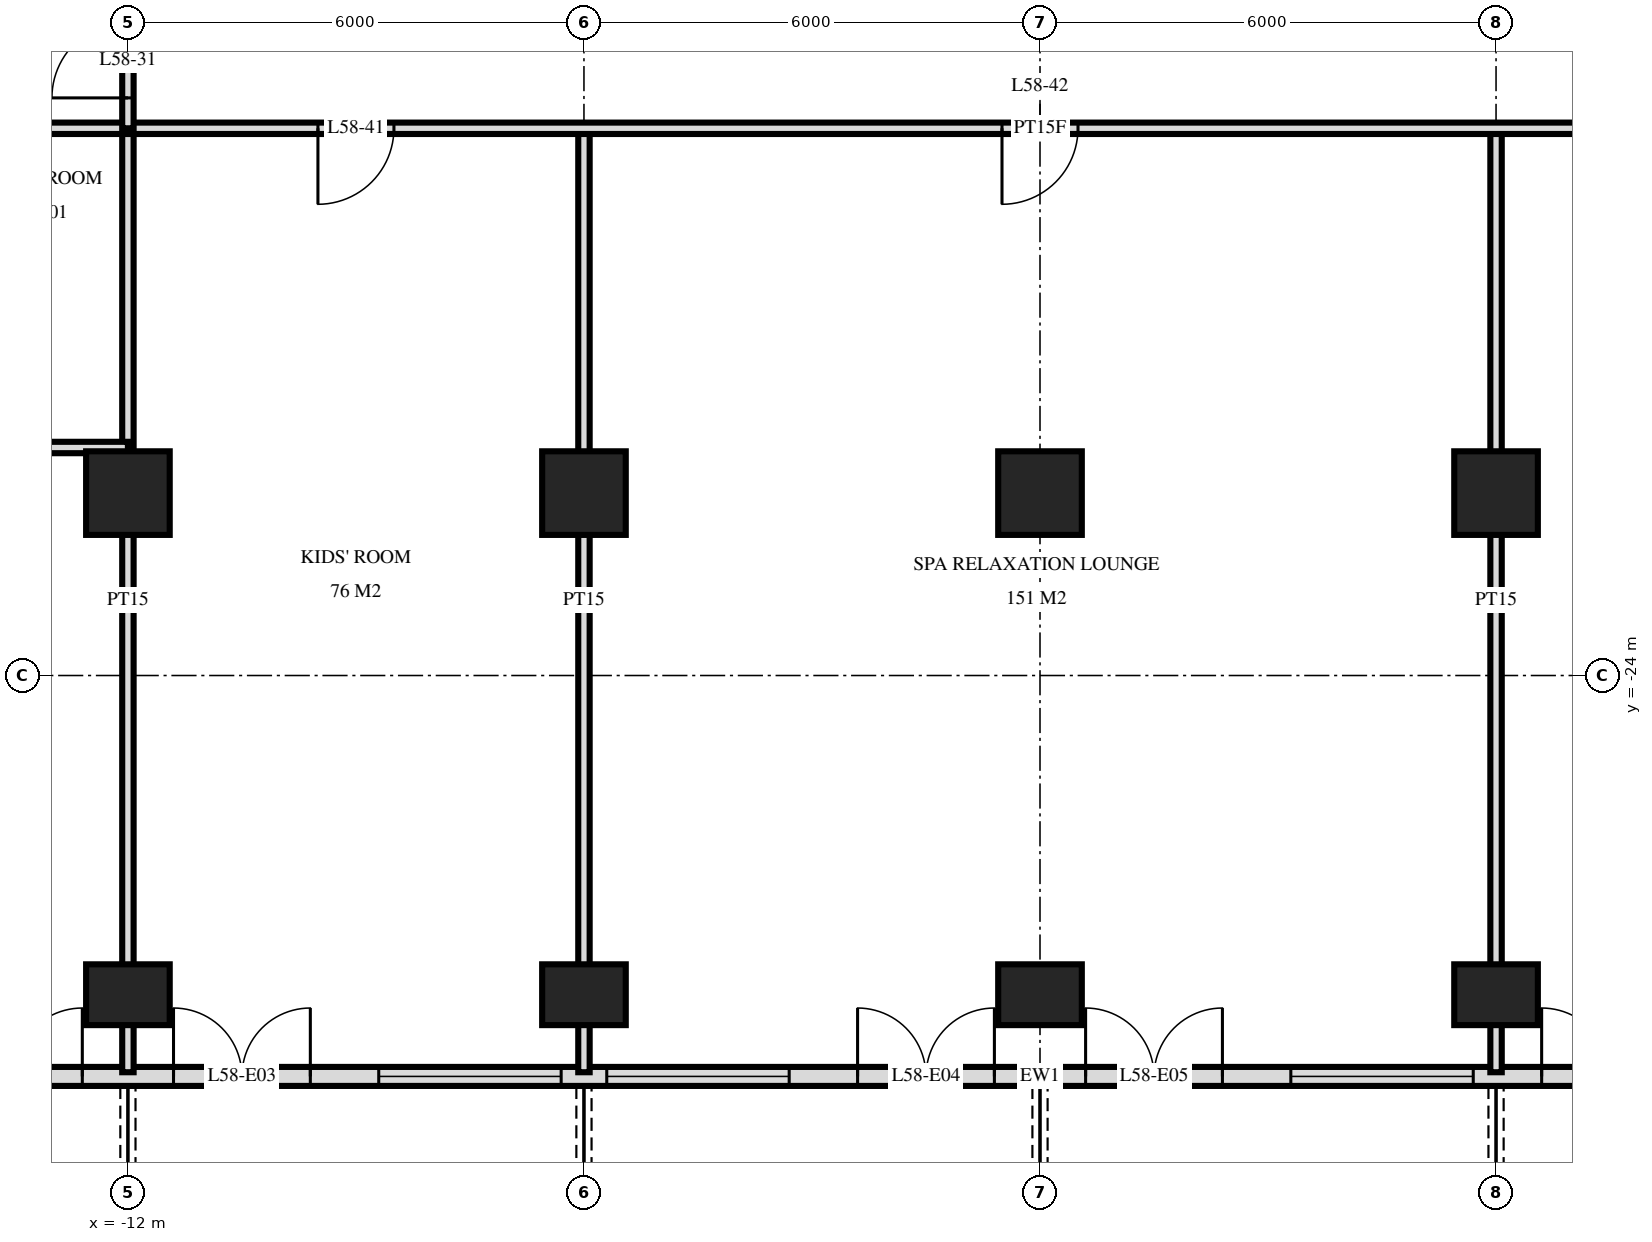
"""IFC4 building model, lengths in metres.
Left out: names, types, materials, properties, quantities, classifications, styles, units other than length and angle.
Written with IfcOpenShell. Run it as: python <this file> out.ifc"""

import sys

from ifc_helpers import new_model, si_unit, direction, frame, frame_2d, origin, origin_2d, place, context, subcontext, project, spatial, rectangle, extrude, element, fill, save


model = new_model("IFC4")
c1 = context("Model", 3, precision=1e-05, world=origin(), true_north=direction((0.0, 1.0)))
c2 = subcontext(c1, "Body", "Model", "MODEL_VIEW")
j1 = project(units=[si_unit("LENGTHUNIT", "METRE"), si_unit("PLANEANGLEUNIT", "RADIAN")], contexts=[c1])
p1 = place(None, origin())
s1 = spatial("IfcSite", under=j1, at=p1, CompositionType="ELEMENT")
p2 = place(p1, origin())
s2 = spatial("IfcBuilding", under=s1, at=p2, CompositionType="ELEMENT")
p3 = place(p2, frame((0.0, 0.0, 222.1)))
s3 = spatial("IfcBuildingStorey", under=s2, at=p3, CompositionType="ELEMENT", Elevation=222.1)
p4 = place(p3, frame((-12.0, -28.2, 0.0), z_axis=(0.0, 0.0, 1.0), x_axis=(1.0, 0.0, 0.0)))
e1 = element("IfcColumn", 1, at=p4, inside=s3, PredefinedType="COLUMN", context=c2, shape_type="SweptSolid", body=[
    extrude(rectangle(XDim=1.1, YDim=0.8, at=origin_2d()), origin(), (0.0, 0.0, 1.0), 3.5),
])
p5 = place(p3, frame((-12.0, -21.6, 0.0), z_axis=(0.0, 0.0, 1.0), x_axis=(1.0, 0.0, 0.0)))
e2 = element("IfcColumn", 2, at=p5, inside=s3, PredefinedType="COLUMN", context=c2, shape_type="SweptSolid", body=[
    extrude(rectangle(XDim=1.1, YDim=1.1, at=origin_2d()), origin(), (0.0, 0.0, 1.0), 3.5),
])
p6 = place(p3, frame((-6.0, -28.2, 0.0), z_axis=(0.0, 0.0, 1.0), x_axis=(1.0, 0.0, 0.0)))
e3 = element("IfcColumn", 3, at=p6, inside=s3, PredefinedType="COLUMN", context=c2, shape_type="SweptSolid", body=[
    extrude(rectangle(XDim=1.1, YDim=0.8, at=origin_2d()), origin(), (0.0, 0.0, 1.0), 3.5),
])
p7 = place(p3, frame((-6.0, -21.6, 0.0), z_axis=(0.0, 0.0, 1.0), x_axis=(1.0, 0.0, 0.0)))
e4 = element("IfcColumn", 4, at=p7, inside=s3, PredefinedType="COLUMN", context=c2, shape_type="SweptSolid", body=[
    extrude(rectangle(XDim=1.1, YDim=1.1, at=origin_2d()), origin(), (0.0, 0.0, 1.0), 3.5),
])
p8 = place(p3, frame((0.0, -28.2, 0.0), z_axis=(0.0, 0.0, 1.0), x_axis=(1.0, 0.0, 0.0)))
e5 = element("IfcColumn", 5, at=p8, inside=s3, PredefinedType="COLUMN", context=c2, shape_type="SweptSolid", body=[
    extrude(rectangle(XDim=1.1, YDim=0.8, at=origin_2d()), origin(), (0.0, 0.0, 1.0), 3.5),
])
p9 = place(p3, frame((0.0, -21.6, 0.0), z_axis=(0.0, 0.0, 1.0), x_axis=(1.0, 0.0, 0.0)))
e6 = element("IfcColumn", 6, at=p9, inside=s3, PredefinedType="COLUMN", context=c2, shape_type="SweptSolid", body=[
    extrude(rectangle(XDim=1.1, YDim=1.1, at=origin_2d()), origin(), (0.0, 0.0, 1.0), 3.5),
])
p10 = place(p3, frame((6.0, -28.2, 0.0), z_axis=(0.0, 0.0, 1.0), x_axis=(1.0, 0.0, 0.0)))
e7 = element("IfcColumn", 7, at=p10, inside=s3, PredefinedType="COLUMN", context=c2, shape_type="SweptSolid", body=[
    extrude(rectangle(XDim=1.1, YDim=0.8, at=origin_2d()), origin(), (0.0, 0.0, 1.0), 3.5),
])
p11 = place(p3, frame((6.0, -21.6, 0.0), z_axis=(0.0, 0.0, 1.0), x_axis=(1.0, 0.0, 0.0)))
e8 = element("IfcColumn", 8, at=p11, inside=s3, PredefinedType="COLUMN", context=c2, shape_type="SweptSolid", body=[
    extrude(rectangle(XDim=1.1, YDim=1.1, at=origin_2d()), origin(), (0.0, 0.0, 1.0), 3.5),
])
p12 = place(p3, frame((-22.475, -29.275, 0.0), z_axis=(0.0, 0.0, 1.0), x_axis=(1.0, 0.0, 0.0)))
e9 = element("IfcWall", 9, at=p12, inside=s3, PredefinedType="SOLIDWALL", context=c2, shape_type="SweptSolid", body=[
    extrude(rectangle(XDim=44.951, YDim=0.25, at=frame_2d((22.475, 0.0))), origin(), (0.0, 0.0, 1.0), 3.22),
])
p13 = place(p12, frame((0.575, 0.0, 0.0)))
e10 = element("IfcOpeningElement", 10, at=p13, cuts=e9, PredefinedType="OPENING", context=c2, shape_type="SweptSolid", body=[
    extrude(rectangle(XDim=1.8, YDim=2.4, at=frame_2d((0.9, 1.2))), frame((0.0, 0.135, 0.0), z_axis=(0.0, -1.0, 0.0), x_axis=(1.0, 0.0, 0.0)), (0.0, 0.0, 1.0), 0.27),
])
p14 = place(p12, frame((4.775, 0.0, 0.9)))
e11 = element("IfcOpeningElement", 11, at=p14, cuts=e9, PredefinedType="OPENING", context=c2, shape_type="SweptSolid", body=[
    extrude(rectangle(XDim=2.4, YDim=1.5, at=frame_2d((1.2, 0.75))), frame((0.0, 0.135, 0.0), z_axis=(0.0, -1.0, 0.0), x_axis=(1.0, 0.0, 0.0)), (0.0, 0.0, 1.0), 0.27),
])
p15 = place(p12, frame((8.075, 0.0, 0.0)))
e12 = element("IfcOpeningElement", 12, at=p15, cuts=e9, PredefinedType="OPENING", context=c2, shape_type="SweptSolid", body=[
    extrude(rectangle(XDim=1.8, YDim=2.4, at=frame_2d((0.9, 1.2))), frame((0.0, 0.135, 0.0), z_axis=(0.0, -1.0, 0.0), x_axis=(1.0, 0.0, 0.0)), (0.0, 0.0, 1.0), 0.27),
])
p16 = place(p12, frame((11.075, 0.0, 0.0)))
e13 = element("IfcOpeningElement", 13, at=p16, cuts=e9, PredefinedType="OPENING", context=c2, shape_type="SweptSolid", body=[
    extrude(rectangle(XDim=1.8, YDim=2.4, at=frame_2d((0.9, 1.2))), frame((0.0, 0.135, 0.0), z_axis=(0.0, -1.0, 0.0), x_axis=(1.0, 0.0, 0.0)), (0.0, 0.0, 1.0), 0.27),
])
p17 = place(p12, frame((13.775, 0.0, 0.9)))
e14 = element("IfcOpeningElement", 14, at=p17, cuts=e9, PredefinedType="OPENING", context=c2, shape_type="SweptSolid", body=[
    extrude(rectangle(XDim=2.4, YDim=1.5, at=frame_2d((1.2, 0.75))), frame((0.0, 0.135, 0.0), z_axis=(0.0, -1.0, 0.0), x_axis=(1.0, 0.0, 0.0)), (0.0, 0.0, 1.0), 0.27),
])
p18 = place(p12, frame((16.775, 0.0, 0.9)))
e15 = element("IfcOpeningElement", 15, at=p18, cuts=e9, PredefinedType="OPENING", context=c2, shape_type="SweptSolid", body=[
    extrude(rectangle(XDim=2.4, YDim=1.5, at=frame_2d((1.2, 0.75))), frame((0.0, 0.135, 0.0), z_axis=(0.0, -1.0, 0.0), x_axis=(1.0, 0.0, 0.0)), (0.0, 0.0, 1.0), 0.27),
])
p19 = place(p12, frame((20.075, 0.0, 0.0)))
e16 = element("IfcOpeningElement", 16, at=p19, cuts=e9, PredefinedType="OPENING", context=c2, shape_type="SweptSolid", body=[
    extrude(rectangle(XDim=1.8, YDim=2.4, at=frame_2d((0.9, 1.2))), frame((0.0, 0.135, 0.0), z_axis=(0.0, -1.0, 0.0), x_axis=(1.0, 0.0, 0.0)), (0.0, 0.0, 1.0), 0.27),
])
p20 = place(p12, frame((23.075, 0.0, 0.0)))
e17 = element("IfcOpeningElement", 17, at=p20, cuts=e9, PredefinedType="OPENING", context=c2, shape_type="SweptSolid", body=[
    extrude(rectangle(XDim=1.8, YDim=2.4, at=frame_2d((0.9, 1.2))), frame((0.0, 0.135, 0.0), z_axis=(0.0, -1.0, 0.0), x_axis=(1.0, 0.0, 0.0)), (0.0, 0.0, 1.0), 0.27),
])
p21 = place(p12, frame((25.775, 0.0, 0.9)))
e18 = element("IfcOpeningElement", 18, at=p21, cuts=e9, PredefinedType="OPENING", context=c2, shape_type="SweptSolid", body=[
    extrude(rectangle(XDim=2.4, YDim=1.5, at=frame_2d((1.2, 0.75))), frame((0.0, 0.135, 0.0), z_axis=(0.0, -1.0, 0.0), x_axis=(1.0, 0.0, 0.0)), (0.0, 0.0, 1.0), 0.27),
])
p22 = place(p12, frame((29.075, 0.0, 0.0)))
e19 = element("IfcOpeningElement", 19, at=p22, cuts=e9, PredefinedType="OPENING", context=c2, shape_type="SweptSolid", body=[
    extrude(rectangle(XDim=1.8, YDim=2.4, at=frame_2d((0.9, 1.2))), frame((0.0, 0.135, 0.0), z_axis=(0.0, -1.0, 0.0), x_axis=(1.0, 0.0, 0.0)), (0.0, 0.0, 1.0), 0.27),
])
p23 = place(p12, frame((31.775, 0.0, 0.9)))
e20 = element("IfcOpeningElement", 20, at=p23, cuts=e9, PredefinedType="OPENING", context=c2, shape_type="SweptSolid", body=[
    extrude(rectangle(XDim=2.4, YDim=1.5, at=frame_2d((1.2, 0.75))), frame((0.0, 0.135, 0.0), z_axis=(0.0, -1.0, 0.0), x_axis=(1.0, 0.0, 0.0)), (0.0, 0.0, 1.0), 0.27),
])
p24 = place(p12, frame((35.075, 0.0, 0.0)))
e21 = element("IfcOpeningElement", 21, at=p24, cuts=e9, PredefinedType="OPENING", context=c2, shape_type="SweptSolid", body=[
    extrude(rectangle(XDim=1.8, YDim=2.4, at=frame_2d((0.9, 1.2))), frame((0.0, 0.135, 0.0), z_axis=(0.0, -1.0, 0.0), x_axis=(1.0, 0.0, 0.0)), (0.0, 0.0, 1.0), 0.27),
])
p25 = place(p12, frame((41.075, 0.0, 0.0)))
e22 = element("IfcOpeningElement", 22, at=p25, cuts=e9, PredefinedType="OPENING", context=c2, shape_type="SweptSolid", body=[
    extrude(rectangle(XDim=1.8, YDim=2.4, at=frame_2d((0.9, 1.2))), frame((0.0, 0.135, 0.0), z_axis=(0.0, -1.0, 0.0), x_axis=(1.0, 0.0, 0.0)), (0.0, 0.0, 1.0), 0.27),
])
for number, where, z_axis, x_axis in (
    (23, (6.0, -29.22, 0.0), (0.0, 0.0, 1.0), (0.0, 1.0, 0.0)),
    (24, (-6.0, -29.22, 0.0), (0.0, 0.0, 1.0), (0.0, 1.0, 0.0)),
):
    element("IfcWall", number, at=place(p3, frame(where, z_axis=z_axis, x_axis=x_axis)), inside=s3, PredefinedType="PARTITIONING", context=c2, shape_type="SweptSolid", body=[
        extrude(rectangle(XDim=12.42, YDim=0.15, at=frame_2d((6.21, 0.0))), origin(), (0.0, 0.0, 1.0), 3.22),
    ])
p26 = place(p3, frame((-12.0, -16.8, 0.0), z_axis=(0.0, 0.0, 1.0), x_axis=(0.0, 1.0, 0.0)))
e25 = element("IfcWall", 25, at=p26, inside=s3, PredefinedType="PARTITIONING", context=c2, shape_type="SweptSolid", body=[
    extrude(rectangle(XDim=1.75, YDim=0.15, at=frame_2d((0.875, 0.0))), origin(), (0.0, 0.0, 1.0), 3.22),
])
p27 = place(p26, frame((0.4, 0.0, 0.0)))
e26 = element("IfcOpeningElement", 26, at=p27, cuts=e25, PredefinedType="OPENING", context=c2, shape_type="SweptSolid", body=[
    extrude(rectangle(XDim=1.0, YDim=2.1, at=frame_2d((0.5, 1.05))), frame((0.0, 0.085, 0.0), z_axis=(0.0, -1.0, 0.0), x_axis=(1.0, 0.0, 0.0)), (0.0, 0.0, 1.0), 0.17),
])
p28 = place(p3, frame((-12.0, -29.22, 0.0), z_axis=(0.0, 0.0, 1.0), x_axis=(0.0, 1.0, 0.0)))
e27 = element("IfcWall", 27, at=p28, inside=s3, PredefinedType="PARTITIONING", context=c2, shape_type="SweptSolid", body=[
    extrude(rectangle(XDim=12.42, YDim=0.15, at=frame_2d((6.21, 0.0))), origin(), (0.0, 0.0, 1.0), 3.22),
])
p29 = place(p3, frame((-14.4, -21.0, 0.0), z_axis=(0.0, 0.0, 1.0), x_axis=(1.0, 0.0, 0.0)))
e28 = element("IfcWall", 28, at=p29, inside=s3, PredefinedType="PARTITIONING", context=c2, shape_type="SweptSolid", body=[
    extrude(rectangle(XDim=2.4, YDim=0.15, at=frame_2d((1.2, 0.0))), origin(), (0.0, 0.0, 1.0), 3.22),
])
p30 = place(p3, frame((-26.82, -16.8, 0.0), z_axis=(0.0, 0.0, 1.0), x_axis=(1.0, 0.0, 0.0)))
e29 = element("IfcWall", 29, at=p30, inside=s3, PredefinedType="PARTITIONING", context=c2, shape_type="SweptSolid", body=[
    extrude(rectangle(XDim=53.64, YDim=0.15, at=frame_2d((26.82, 0.0))), origin(), (0.0, 0.0, 1.0), 3.22),
])
p31 = place(p30, frame((11.17, 0.0, 0.0)))
e30 = element("IfcOpeningElement", 30, at=p31, cuts=e29, PredefinedType="OPENING", context=c2, shape_type="SweptSolid", body=[
    extrude(rectangle(XDim=1.0, YDim=2.1, at=frame_2d((0.5, 1.05))), frame((0.0, 0.085, 0.0), z_axis=(0.0, -1.0, 0.0), x_axis=(1.0, 0.0, 0.0)), (0.0, 0.0, 1.0), 0.17),
])
p32 = place(p30, frame((3.22, 0.0, 0.0)))
e31 = element("IfcOpeningElement", 31, at=p32, cuts=e29, PredefinedType="OPENING", context=c2, shape_type="SweptSolid", body=[
    extrude(rectangle(XDim=1.0, YDim=2.1, at=frame_2d((0.5, 1.05))), frame((0.0, 0.085, 0.0), z_axis=(0.0, -1.0, 0.0), x_axis=(1.0, 0.0, 0.0)), (0.0, 0.0, 1.0), 0.17),
])
p33 = place(p30, frame((5.02, 0.0, 0.0)))
e32 = element("IfcOpeningElement", 32, at=p33, cuts=e29, PredefinedType="OPENING", context=c2, shape_type="SweptSolid", body=[
    extrude(rectangle(XDim=1.0, YDim=2.1, at=frame_2d((0.5, 1.05))), frame((0.0, 0.085, 0.0), z_axis=(0.0, -1.0, 0.0), x_axis=(1.0, 0.0, 0.0)), (0.0, 0.0, 1.0), 0.17),
])
p34 = place(p30, frame((47.72, 0.0, 0.0)))
e33 = element("IfcOpeningElement", 33, at=p34, cuts=e29, PredefinedType="OPENING", context=c2, shape_type="SweptSolid", body=[
    extrude(rectangle(XDim=1.0, YDim=2.1, at=frame_2d((0.5, 1.05))), frame((0.0, 0.085, 0.0), z_axis=(0.0, -1.0, 0.0), x_axis=(1.0, 0.0, 0.0)), (0.0, 0.0, 1.0), 0.17),
])
p35 = place(p30, frame((51.04, 0.0, 0.0)))
e34 = element("IfcOpeningElement", 34, at=p35, cuts=e29, PredefinedType="OPENING", context=c2, shape_type="SweptSolid", body=[
    extrude(rectangle(XDim=1.0, YDim=2.1, at=frame_2d((0.5, 1.05))), frame((0.0, 0.085, 0.0), z_axis=(0.0, -1.0, 0.0), x_axis=(1.0, 0.0, 0.0)), (0.0, 0.0, 1.0), 0.17),
])
p36 = place(p30, frame((17.32, 0.0, 0.0)))
e35 = element("IfcOpeningElement", 35, at=p36, cuts=e29, PredefinedType="OPENING", context=c2, shape_type="SweptSolid", body=[
    extrude(rectangle(XDim=1.0, YDim=2.1, at=frame_2d((0.5, 1.05))), frame((0.0, 0.085, 0.0), z_axis=(0.0, -1.0, 0.0), x_axis=(1.0, 0.0, 0.0)), (0.0, 0.0, 1.0), 0.17),
])
p37 = place(p30, frame((26.32, 0.0, 0.0)))
e36 = element("IfcOpeningElement", 36, at=p37, cuts=e29, PredefinedType="OPENING", context=c2, shape_type="SweptSolid", body=[
    extrude(rectangle(XDim=1.0, YDim=2.1, at=frame_2d((0.5, 1.05))), frame((0.0, 0.085, 0.0), z_axis=(0.0, -1.0, 0.0), x_axis=(1.0, 0.0, 0.0)), (0.0, 0.0, 1.0), 0.17),
])
p38 = place(p30, frame((35.32, 0.0, 0.0)))
e37 = element("IfcOpeningElement", 37, at=p38, cuts=e29, PredefinedType="OPENING", context=c2, shape_type="SweptSolid", body=[
    extrude(rectangle(XDim=1.0, YDim=2.1, at=frame_2d((0.5, 1.05))), frame((0.0, 0.085, 0.0), z_axis=(0.0, -1.0, 0.0), x_axis=(1.0, 0.0, 0.0)), (0.0, 0.0, 1.0), 0.17),
])
p39 = place(p15, origin())
e38 = element("IfcDoor", 38, at=p39, inside=s3, OperationType="DOUBLE_DOOR_SINGLE_SWING", PredefinedType="DOOR", context=c2, shape_type="SweptSolid", body=[
    extrude(rectangle(XDim=1.8, YDim=2.4, at=frame_2d((0.9, 1.2))), frame((0.0, 0.025, 0.0), z_axis=(0.0, -1.0, 0.0), x_axis=(1.0, 0.0, 0.0)), (0.0, 0.0, 1.0), 0.05),
])
fill(e12, e38)
p40 = place(p16, origin())
e39 = element("IfcDoor", 39, at=p40, inside=s3, OperationType="DOUBLE_DOOR_SINGLE_SWING", PredefinedType="DOOR", context=c2, shape_type="SweptSolid", body=[
    extrude(rectangle(XDim=1.8, YDim=2.4, at=frame_2d((0.9, 1.2))), frame((0.0, 0.025, 0.0), z_axis=(0.0, -1.0, 0.0), x_axis=(1.0, 0.0, 0.0)), (0.0, 0.0, 1.0), 0.05),
])
fill(e13, e39)
p41 = place(p17, origin())
e40 = element("IfcWindow", 40, at=p41, inside=s3, PartitioningType="SINGLE_PANEL", PredefinedType="WINDOW", context=c2, shape_type="SweptSolid", body=[
    extrude(rectangle(XDim=2.4, YDim=1.5, at=frame_2d((1.2, 0.75))), frame((0.0, 0.03, 0.0), z_axis=(0.0, -1.0, 0.0), x_axis=(1.0, 0.0, 0.0)), (0.0, 0.0, 1.0), 0.06),
])
fill(e14, e40)
p42 = place(p18, origin())
e41 = element("IfcWindow", 41, at=p42, inside=s3, PartitioningType="SINGLE_PANEL", PredefinedType="WINDOW", context=c2, shape_type="SweptSolid", body=[
    extrude(rectangle(XDim=2.4, YDim=1.5, at=frame_2d((1.2, 0.75))), frame((0.0, 0.03, 0.0), z_axis=(0.0, -1.0, 0.0), x_axis=(1.0, 0.0, 0.0)), (0.0, 0.0, 1.0), 0.06),
])
fill(e15, e41)
p43 = place(p19, origin())
e42 = element("IfcDoor", 42, at=p43, inside=s3, OperationType="DOUBLE_DOOR_SINGLE_SWING", PredefinedType="DOOR", context=c2, shape_type="SweptSolid", body=[
    extrude(rectangle(XDim=1.8, YDim=2.4, at=frame_2d((0.9, 1.2))), frame((0.0, 0.025, 0.0), z_axis=(0.0, -1.0, 0.0), x_axis=(1.0, 0.0, 0.0)), (0.0, 0.0, 1.0), 0.05),
])
fill(e16, e42)
p44 = place(p20, origin())
e43 = element("IfcDoor", 43, at=p44, inside=s3, OperationType="DOUBLE_DOOR_SINGLE_SWING", PredefinedType="DOOR", context=c2, shape_type="SweptSolid", body=[
    extrude(rectangle(XDim=1.8, YDim=2.4, at=frame_2d((0.9, 1.2))), frame((0.0, 0.025, 0.0), z_axis=(0.0, -1.0, 0.0), x_axis=(1.0, 0.0, 0.0)), (0.0, 0.0, 1.0), 0.05),
])
fill(e17, e43)
p45 = place(p21, origin())
e44 = element("IfcWindow", 44, at=p45, inside=s3, PartitioningType="SINGLE_PANEL", PredefinedType="WINDOW", context=c2, shape_type="SweptSolid", body=[
    extrude(rectangle(XDim=2.4, YDim=1.5, at=frame_2d((1.2, 0.75))), frame((0.0, 0.03, 0.0), z_axis=(0.0, -1.0, 0.0), x_axis=(1.0, 0.0, 0.0)), (0.0, 0.0, 1.0), 0.06),
])
fill(e18, e44)
p46 = place(p22, origin())
e45 = element("IfcDoor", 45, at=p46, inside=s3, OperationType="DOUBLE_DOOR_SINGLE_SWING", PredefinedType="DOOR", context=c2, shape_type="SweptSolid", body=[
    extrude(rectangle(XDim=1.8, YDim=2.4, at=frame_2d((0.9, 1.2))), frame((0.0, 0.025, 0.0), z_axis=(0.0, -1.0, 0.0), x_axis=(1.0, 0.0, 0.0)), (0.0, 0.0, 1.0), 0.05),
])
fill(e19, e45)
p47 = place(p27, origin())
e46 = element("IfcDoor", 46, at=p47, inside=s3, OperationType="SINGLE_SWING_RIGHT", PredefinedType="DOOR", context=c2, shape_type="SweptSolid", body=[
    extrude(rectangle(XDim=1.0, YDim=2.1, at=frame_2d((0.5, 1.05))), frame((0.0, 0.025, 0.0), z_axis=(0.0, -1.0, 0.0), x_axis=(1.0, 0.0, 0.0)), (0.0, 0.0, 1.0), 0.05),
])
fill(e26, e46)
p48 = place(p36, frame((0.5, 0.0, 0.0), z_axis=(0.0, 0.0, 1.0), x_axis=(-1.0, 0.0, 0.0)))
e47 = element("IfcDoor", 47, at=p48, inside=s3, OperationType="SINGLE_SWING_LEFT", PredefinedType="DOOR", context=c2, shape_type="SweptSolid", body=[
    extrude(rectangle(XDim=1.0, YDim=2.1, at=frame_2d((0.0, 1.05))), frame((0.0, -0.025, 0.0), z_axis=(0.0, 1.0, 0.0), x_axis=(-1.0, 0.0, 0.0)), (0.0, 0.0, 1.0), 0.05),
])
fill(e35, e47)
p49 = place(p37, frame((0.5, 0.0, 0.0), z_axis=(0.0, 0.0, 1.0), x_axis=(-1.0, 0.0, 0.0)))
e48 = element("IfcDoor", 48, at=p49, inside=s3, OperationType="SINGLE_SWING_LEFT", PredefinedType="DOOR", context=c2, shape_type="SweptSolid", body=[
    extrude(rectangle(XDim=1.0, YDim=2.1, at=frame_2d((0.0, 1.05))), frame((0.0, -0.025, 0.0), z_axis=(0.0, 1.0, 0.0), x_axis=(-1.0, 0.0, 0.0)), (0.0, 0.0, 1.0), 0.05),
])
fill(e36, e48)
save(model, sys.argv[1])
